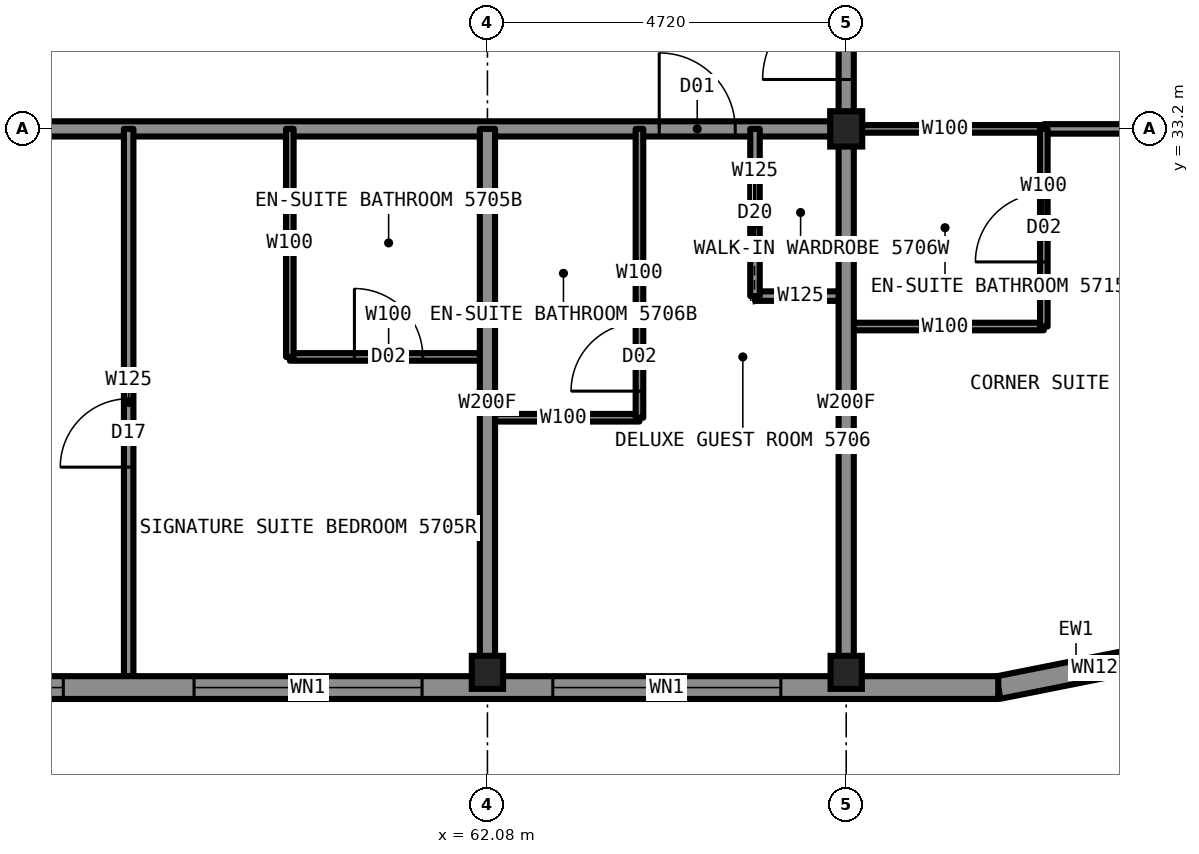
"""IFC4 building model, lengths in metres.
Left out: names, types, materials, properties, quantities, classifications, styles, units other than length and angle.
Written with IfcOpenShell. Run it as: python <this file> out.ifc"""

import sys

from ifc_helpers import new_model, si_unit, direction, frame, frame_2d, origin, origin_2d, place, context, subcontext, project, spatial, rectangle, i_section, extrude, element, fill, save


model = new_model("IFC4")
c1 = context("Model", 3, precision=1e-05, world=origin(), true_north=direction((0.0, 1.0)))
c2 = subcontext(c1, "Body", "Model", "MODEL_VIEW")
j1 = project(units=[si_unit("LENGTHUNIT", "METRE"), si_unit("PLANEANGLEUNIT", "RADIAN")], contexts=[c1])
p1 = place(None, origin())
s1 = spatial("IfcSite", under=j1, at=p1, CompositionType="ELEMENT")
p2 = place(p1, origin())
s2 = spatial("IfcBuilding", under=s1, at=p2, CompositionType="ELEMENT")
p3 = place(p2, frame((0.0, 0.0, 203.8)))
s3 = spatial("IfcBuildingStorey", under=s2, at=p3, CompositionType="ELEMENT", Elevation=203.8)
for number, where, z_axis, x_axis in (
    (1, (62.08, 26.05, 0.0), (0.0, 0.0, 1.0), (1.0, 0.0, 0.0)),
    (2, (66.8, 26.05, 0.0), (0.0, 0.0, 1.0), (1.0, 0.0, 0.0)),
):
    element("IfcColumn", number, at=place(p3, frame(where, z_axis=z_axis, x_axis=x_axis)), inside=s3, PredefinedType="COLUMN", context=c2, shape_type="SweptSolid", body=[
        extrude(i_section(OverallWidth=0.411, OverallDepth=0.434, WebThickness=0.036, FlangeThickness=0.057, at=origin_2d()), origin(), (0.0, 0.0, 1.0), 3.5),
    ])
p4 = place(p3, frame((66.8, 33.2, 0.0), z_axis=(0.0, 0.0, 1.0), x_axis=(1.0, 0.0, 0.0)))
e3 = element("IfcColumn", 3, at=p4, inside=s3, PredefinedType="COLUMN", context=c2, shape_type="SweptSolid", body=[
    extrude(i_section(OverallWidth=0.422, OverallDepth=0.465, WebThickness=0.045, FlangeThickness=0.073, at=origin_2d()), origin(), (0.0, 0.0, 1.0), 3.5),
])
p5 = place(p3, frame((66.8, 33.2, 0.0), z_axis=(0.0, 0.0, 1.0), x_axis=(1.0, 0.0, 0.0)))
e4 = element("IfcWall", 4, at=p5, inside=s3, PredefinedType="PARTITIONING", context=c2, shape_type="SweptSolid", body=[
    extrude(rectangle(XDim=2.6, YDim=0.1, at=frame_2d((1.3, 0.0))), origin(), (0.0, 0.0, 1.0), 2.573),
])
p6 = place(p3, frame((43.2, 33.2, 0.0), z_axis=(0.0, 0.0, 1.0), x_axis=(1.0, 0.0, 0.0)))
e5 = element("IfcWall", 5, at=p6, inside=s3, PredefinedType="PARTITIONING", context=c2, shape_type="SweptSolid", body=[
    extrude(rectangle(XDim=23.6, YDim=0.2, at=frame_2d((11.8, 0.0))), origin(), (0.0, 0.0, 1.0), 3.33),
])
p7 = place(p6, frame((2.55, 0.0, 0.0)))
e6 = element("IfcOpeningElement", 6, at=p7, cuts=e5, PredefinedType="OPENING", context=c2, shape_type="SweptSolid", body=[
    extrude(rectangle(XDim=1.0, YDim=2.2, at=frame_2d((0.5, 1.1))), frame((0.0, 0.11, 0.0), z_axis=(0.0, -1.0, 0.0), x_axis=(1.0, 0.0, 0.0)), (0.0, 0.0, 1.0), 0.22),
])
p8 = place(p6, frame((6.57, 0.0, 0.0)))
e7 = element("IfcOpeningElement", 7, at=p8, cuts=e5, PredefinedType="OPENING", context=c2, shape_type="SweptSolid", body=[
    extrude(rectangle(XDim=1.1, YDim=2.2, at=frame_2d((0.55, 1.1))), frame((0.0, 0.11, 0.0), z_axis=(0.0, -1.0, 0.0), x_axis=(1.0, 0.0, 0.0)), (0.0, 0.0, 1.0), 0.22),
])
p9 = place(p6, frame((21.14, 0.0, 0.0)))
e8 = element("IfcOpeningElement", 8, at=p9, cuts=e5, PredefinedType="OPENING", context=c2, shape_type="SweptSolid", body=[
    extrude(rectangle(XDim=1.0, YDim=2.2, at=frame_2d((0.5, 1.1))), frame((0.0, 0.11, 0.0), z_axis=(0.0, -1.0, 0.0), x_axis=(1.0, 0.0, 0.0)), (0.0, 0.0, 1.0), 0.22),
])
p10 = place(p3, frame((69.4, 33.2, 0.0), z_axis=(0.0, 0.0, 1.0), x_axis=(1.0, 0.0, 0.0)))
e9 = element("IfcWall", 9, at=p10, inside=s3, PredefinedType="PARTITIONING", context=c2, shape_type="SweptSolid", body=[
    extrude(rectangle(XDim=4.6, YDim=0.125, at=frame_2d((2.3, 0.0))), origin(), (0.0, 0.0, 1.0), 2.573),
])
p11 = place(p10, frame((1.15, 0.0, 0.0)))
e10 = element("IfcOpeningElement", 10, at=p11, cuts=e9, PredefinedType="OPENING", context=c2, shape_type="SweptSolid", body=[
    extrude(rectangle(XDim=0.9, YDim=2.2, at=frame_2d((0.45, 1.1))), frame((0.0, 0.073, 0.0), z_axis=(0.0, -1.0, 0.0), x_axis=(1.0, 0.0, 0.0)), (0.0, 0.0, 1.0), 0.145),
])
p12 = place(p3, frame((65.6, 31.0, 0.0), z_axis=(0.0, 0.0, 1.0), x_axis=(1.0, 0.0, 0.0)))
e11 = element("IfcWall", 11, at=p12, inside=s3, PredefinedType="PARTITIONING", context=c2, shape_type="SweptSolid", body=[
    extrude(rectangle(XDim=1.2, YDim=0.125, at=frame_2d((0.6, 0.0))), origin(), (0.0, 0.0, 1.0), 3.33),
])
p13 = place(p3, frame((66.8, 30.6, 0.0), z_axis=(0.0, 0.0, 1.0), x_axis=(1.0, 0.0, 0.0)))
e12 = element("IfcWall", 12, at=p13, inside=s3, PredefinedType="PARTITIONING", context=c2, shape_type="SweptSolid", body=[
    extrude(rectangle(XDim=2.6, YDim=0.1, at=frame_2d((1.3, 0.0))), origin(), (0.0, 0.0, 1.0), 3.33),
])
p14 = place(p3, frame((59.48, 30.2, 0.0), z_axis=(0.0, 0.0, 1.0), x_axis=(1.0, 0.0, 0.0)))
e13 = element("IfcWall", 13, at=p14, inside=s3, PredefinedType="PARTITIONING", context=c2, shape_type="SweptSolid", body=[
    extrude(rectangle(XDim=2.6, YDim=0.1, at=frame_2d((1.3, 0.0))), origin(), (0.0, 0.0, 1.0), 3.33),
])
p15 = place(p14, frame((0.85, 0.0, 0.0)))
e14 = element("IfcOpeningElement", 14, at=p15, cuts=e13, PredefinedType="OPENING", context=c2, shape_type="SweptSolid", body=[
    extrude(rectangle(XDim=0.9, YDim=2.1, at=frame_2d((0.45, 1.05))), frame((0.0, 0.06, 0.0), z_axis=(0.0, -1.0, 0.0), x_axis=(1.0, 0.0, 0.0)), (0.0, 0.0, 1.0), 0.12),
])
p16 = place(p3, frame((62.08, 29.4, 0.0), z_axis=(0.0, 0.0, 1.0), x_axis=(1.0, 0.0, 0.0)))
e15 = element("IfcWall", 15, at=p16, inside=s3, PredefinedType="PARTITIONING", context=c2, shape_type="SweptSolid", body=[
    extrude(rectangle(XDim=2.0, YDim=0.1, at=frame_2d((1.0, 0.0))), origin(), (0.0, 0.0, 1.0), 3.33),
])
p17 = place(p3, frame((65.6, 31.0, 0.0), z_axis=(0.0, 0.0, 1.0), x_axis=(0.0, 1.0, 0.0)))
e16 = element("IfcWall", 16, at=p17, inside=s3, PredefinedType="PARTITIONING", context=c2, shape_type="SweptSolid", body=[
    extrude(rectangle(XDim=2.2, YDim=0.125, at=frame_2d((1.1, 0.0))), origin(), (0.0, 0.0, 1.0), 3.33),
])
p18 = place(p17, frame((0.7, 0.0, 0.0)))
e17 = element("IfcOpeningElement", 17, at=p18, cuts=e16, PredefinedType="OPENING", context=c2, shape_type="SweptSolid", body=[
    extrude(rectangle(XDim=0.8, YDim=2.1, at=frame_2d((0.4, 1.05))), frame((0.0, 0.073, 0.0), z_axis=(0.0, -1.0, 0.0), x_axis=(1.0, 0.0, 0.0)), (0.0, 0.0, 1.0), 0.145),
])
p19 = place(p3, frame((66.8, 33.2, 0.0), z_axis=(0.0, 0.0, 1.0), x_axis=(0.0, 1.0, 0.0)))
e18 = element("IfcWall", 18, at=p19, inside=s3, PredefinedType="PARTITIONING", context=c2, shape_type="SweptSolid", body=[
    extrude(rectangle(XDim=23.58, YDim=0.2, at=frame_2d((11.79, 0.0))), origin(), (0.0, 0.0, 1.0), 3.33),
])
p20 = place(p19, frame((6.98, 0.0, 0.0)))
e19 = element("IfcOpeningElement", 19, at=p20, cuts=e18, PredefinedType="OPENING", context=c2, shape_type="SweptSolid", body=[
    extrude(rectangle(XDim=1.0, YDim=2.2, at=frame_2d((0.5, 1.1))), frame((0.0, 0.11, 0.0), z_axis=(0.0, -1.0, 0.0), x_axis=(1.0, 0.0, 0.0)), (0.0, 0.0, 1.0), 0.22),
])
p21 = place(p19, frame((11.7, 0.0, 0.0)))
e20 = element("IfcOpeningElement", 20, at=p21, cuts=e18, PredefinedType="OPENING", context=c2, shape_type="SweptSolid", body=[
    extrude(rectangle(XDim=1.0, YDim=2.2, at=frame_2d((0.5, 1.1))), frame((0.0, 0.11, 0.0), z_axis=(0.0, -1.0, 0.0), x_axis=(1.0, 0.0, 0.0)), (0.0, 0.0, 1.0), 0.22),
])
p22 = place(p19, frame((15.62, 0.0, 0.0)))
e21 = element("IfcOpeningElement", 21, at=p22, cuts=e18, PredefinedType="OPENING", context=c2, shape_type="SweptSolid", body=[
    extrude(rectangle(XDim=1.0, YDim=2.2, at=frame_2d((0.5, 1.1))), frame((0.0, 0.11, 0.0), z_axis=(0.0, -1.0, 0.0), x_axis=(1.0, 0.0, 0.0)), (0.0, 0.0, 1.0), 0.22),
])
p23 = place(p19, frame((22.05, 0.0, 0.0)))
e22 = element("IfcOpeningElement", 22, at=p23, cuts=e18, PredefinedType="OPENING", context=c2, shape_type="SweptSolid", body=[
    extrude(rectangle(XDim=1.1, YDim=2.2, at=frame_2d((0.55, 1.1))), frame((0.0, 0.11, 0.0), z_axis=(0.0, -1.0, 0.0), x_axis=(1.0, 0.0, 0.0)), (0.0, 0.0, 1.0), 0.22),
])
p24 = place(p19, frame((0.65, 0.0, 0.0)))
e23 = element("IfcOpeningElement", 23, at=p24, cuts=e18, PredefinedType="OPENING", context=c2, shape_type="SweptSolid", body=[
    extrude(rectangle(XDim=1.1, YDim=2.2, at=frame_2d((0.55, 1.1))), frame((0.0, 0.11, 0.0), z_axis=(0.0, -1.0, 0.0), x_axis=(1.0, 0.0, 0.0)), (0.0, 0.0, 1.0), 0.22),
])
p25 = place(p3, frame((66.8, 26.0, 0.0), z_axis=(0.0, 0.0, 1.0), x_axis=(0.0, 1.0, 0.0)))
e24 = element("IfcWall", 24, at=p25, inside=s3, PredefinedType="PARTITIONING", context=c2, shape_type="SweptSolid", body=[
    extrude(rectangle(XDim=7.2, YDim=0.2, at=frame_2d((3.6, 0.0))), origin(), (0.0, 0.0, 1.0), 2.573),
])
p26 = place(p3, frame((69.4, 30.6, 0.0), z_axis=(0.0, 0.0, 1.0), x_axis=(0.0, 1.0, 0.0)))
e25 = element("IfcWall", 25, at=p26, inside=s3, PredefinedType="PARTITIONING", context=c2, shape_type="SweptSolid", body=[
    extrude(rectangle(XDim=2.6, YDim=0.1, at=frame_2d((1.3, 0.0))), origin(), (0.0, 0.0, 1.0), 3.33),
])
p27 = place(p26, frame((0.85, 0.0, 0.0)))
e26 = element("IfcOpeningElement", 26, at=p27, cuts=e25, PredefinedType="OPENING", context=c2, shape_type="SweptSolid", body=[
    extrude(rectangle(XDim=0.9, YDim=2.1, at=frame_2d((0.45, 1.05))), frame((0.0, 0.06, 0.0), z_axis=(0.0, -1.0, 0.0), x_axis=(1.0, 0.0, 0.0)), (0.0, 0.0, 1.0), 0.12),
])
p28 = place(p3, frame((57.36, 26.0, 0.0), z_axis=(0.0, 0.0, 1.0), x_axis=(0.0, 1.0, 0.0)))
e27 = element("IfcWall", 27, at=p28, inside=s3, PredefinedType="PARTITIONING", context=c2, shape_type="SweptSolid", body=[
    extrude(rectangle(XDim=7.2, YDim=0.125, at=frame_2d((3.6, 0.0))), origin(), (0.0, 0.0, 1.0), 3.33),
])
p29 = place(p28, frame((2.75, 0.0, 0.0)))
e28 = element("IfcOpeningElement", 28, at=p29, cuts=e27, PredefinedType="OPENING", context=c2, shape_type="SweptSolid", body=[
    extrude(rectangle(XDim=0.9, YDim=2.2, at=frame_2d((0.45, 1.1))), frame((0.0, 0.073, 0.0), z_axis=(0.0, -1.0, 0.0), x_axis=(1.0, 0.0, 0.0)), (0.0, 0.0, 1.0), 0.145),
])
p30 = place(p3, frame((59.48, 30.2, 0.0), z_axis=(0.0, 0.0, 1.0), x_axis=(0.0, 1.0, 0.0)))
e29 = element("IfcWall", 29, at=p30, inside=s3, PredefinedType="PARTITIONING", context=c2, shape_type="SweptSolid", body=[
    extrude(rectangle(XDim=3.0, YDim=0.1, at=frame_2d((1.5, 0.0))), origin(), (0.0, 0.0, 1.0), 3.33),
])
p31 = place(p3, frame((62.08, 26.0, 0.0), z_axis=(0.0, 0.0, 1.0), x_axis=(0.0, 1.0, 0.0)))
e30 = element("IfcWall", 30, at=p31, inside=s3, PredefinedType="PARTITIONING", context=c2, shape_type="SweptSolid", body=[
    extrude(rectangle(XDim=7.2, YDim=0.2, at=frame_2d((3.6, 0.0))), origin(), (0.0, 0.0, 1.0), 2.573),
])
p32 = place(p3, frame((64.08, 29.4, 0.0), z_axis=(0.0, 0.0, 1.0), x_axis=(0.0, 1.0, 0.0)))
e31 = element("IfcWall", 31, at=p32, inside=s3, PredefinedType="PARTITIONING", context=c2, shape_type="SweptSolid", body=[
    extrude(rectangle(XDim=3.8, YDim=0.1, at=frame_2d((1.9, 0.0))), origin(), (0.0, 0.0, 1.0), 3.33),
])
p33 = place(p32, frame((0.35, 0.0, 0.0)))
e32 = element("IfcOpeningElement", 32, at=p33, cuts=e31, PredefinedType="OPENING", context=c2, shape_type="SweptSolid", body=[
    extrude(rectangle(XDim=0.9, YDim=2.1, at=frame_2d((0.45, 1.05))), frame((0.0, 0.06, 0.0), z_axis=(0.0, -1.0, 0.0), x_axis=(1.0, 0.0, 0.0)), (0.0, 0.0, 1.0), 0.12),
])
p34 = place(p3, frame((68.8, 25.85, 0.0), z_axis=(0.0, 0.0, 1.0), x_axis=(0.980787050784, 0.195081421501, 0.0)))
e33 = element("IfcWall", 33, at=p34, inside=s3, PredefinedType="SOLIDWALL", context=c2, shape_type="SweptSolid", body=[
    extrude(rectangle(XDim=2.087, YDim=0.3, at=frame_2d((1.044, 0.0))), origin(), (0.0, 0.0, 1.0), 3.33),
])
p35 = place(p34, frame((0.444, 0.0, 0.3)))
e34 = element("IfcOpeningElement", 34, at=p35, cuts=e33, PredefinedType="OPENING", context=c2, shape_type="SweptSolid", body=[
    extrude(rectangle(XDim=1.2, YDim=2.0, at=frame_2d((0.6, 1.0))), frame((0.0, 0.16, 0.0), z_axis=(0.0, -1.0, 0.0), x_axis=(1.0, 0.0, 0.0)), (0.0, 0.0, 1.0), 0.32),
])
p36 = place(p3, frame((41.2, 25.85, 0.0), z_axis=(0.0, 0.0, 1.0), x_axis=(1.0, 0.0, 0.0)))
e35 = element("IfcWall", 35, at=p36, inside=s3, PredefinedType="SOLIDWALL", context=c2, shape_type="SweptSolid", body=[
    extrude(rectangle(XDim=27.6, YDim=0.3, at=frame_2d((13.8, 0.0))), origin(), (0.0, 0.0, 1.0), 2.83),
])
p37 = place(p36, frame((2.86, 0.0, 0.3)))
e36 = element("IfcOpeningElement", 36, at=p37, cuts=e35, PredefinedType="OPENING", context=c2, shape_type="SweptSolid", body=[
    extrude(rectangle(XDim=0.7, YDim=1.2, at=frame_2d((0.35, 0.6))), frame((0.0, 0.16, 0.0), z_axis=(0.0, -1.0, 0.0), x_axis=(1.0, 0.0, 0.0)), (0.0, 0.0, 1.0), 0.32),
])
p38 = place(p36, frame((7.58, 0.0, 0.3)))
e37 = element("IfcOpeningElement", 37, at=p38, cuts=e35, PredefinedType="OPENING", context=c2, shape_type="SweptSolid", body=[
    extrude(rectangle(XDim=3.0, YDim=2.0, at=frame_2d((1.5, 1.0))), frame((0.0, 0.16, 0.0), z_axis=(0.0, -1.0, 0.0), x_axis=(1.0, 0.0, 0.0)), (0.0, 0.0, 1.0), 0.32),
])
p39 = place(p36, frame((12.3, 0.0, 0.3)))
e38 = element("IfcOpeningElement", 38, at=p39, cuts=e35, PredefinedType="OPENING", context=c2, shape_type="SweptSolid", body=[
    extrude(rectangle(XDim=3.0, YDim=2.0, at=frame_2d((1.5, 1.0))), frame((0.0, 0.16, 0.0), z_axis=(0.0, -1.0, 0.0), x_axis=(1.0, 0.0, 0.0)), (0.0, 0.0, 1.0), 0.32),
])
p40 = place(p36, frame((17.02, 0.0, 0.3)))
e39 = element("IfcOpeningElement", 39, at=p40, cuts=e35, PredefinedType="OPENING", context=c2, shape_type="SweptSolid", body=[
    extrude(rectangle(XDim=3.0, YDim=2.0, at=frame_2d((1.5, 1.0))), frame((0.0, 0.16, 0.0), z_axis=(0.0, -1.0, 0.0), x_axis=(1.0, 0.0, 0.0)), (0.0, 0.0, 1.0), 0.32),
])
p41 = place(p36, frame((23.99, 0.0, 0.3)))
e40 = element("IfcOpeningElement", 40, at=p41, cuts=e35, PredefinedType="OPENING", context=c2, shape_type="SweptSolid", body=[
    extrude(rectangle(XDim=0.7, YDim=1.2, at=frame_2d((0.35, 0.6))), frame((0.0, 0.16, 0.0), z_axis=(0.0, -1.0, 0.0), x_axis=(1.0, 0.0, 0.0)), (0.0, 0.0, 1.0), 0.32),
])
p42 = place(p15, origin())
e41 = element("IfcDoor", 41, at=p42, inside=s3, OperationType="SINGLE_SWING_RIGHT", PredefinedType="DOOR", context=c2, shape_type="SweptSolid", body=[
    extrude(rectangle(XDim=0.9, YDim=2.1, at=frame_2d((0.45, 1.05))), frame((0.0, 0.025, 0.0), z_axis=(0.0, -1.0, 0.0), x_axis=(1.0, 0.0, 0.0)), (0.0, 0.0, 1.0), 0.05),
])
fill(e14, e41)
p43 = place(p29, origin())
e42 = element("IfcDoor", 42, at=p43, inside=s3, OperationType="SINGLE_SWING_LEFT", PredefinedType="DOOR", context=c2, shape_type="SweptSolid", body=[
    extrude(rectangle(XDim=0.9, YDim=2.2, at=frame_2d((0.45, 1.1))), frame((0.0, 0.025, 0.0), z_axis=(0.0, -1.0, 0.0), x_axis=(1.0, 0.0, 0.0)), (0.0, 0.0, 1.0), 0.05),
])
fill(e28, e42)
p44 = place(p9, origin())
e43 = element("IfcDoor", 43, at=p44, inside=s3, OperationType="SINGLE_SWING_LEFT", PredefinedType="DOOR", context=c2, shape_type="SweptSolid", body=[
    extrude(rectangle(XDim=1.0, YDim=2.2, at=frame_2d((0.5, 1.1))), frame((0.0, 0.025, 0.0), z_axis=(0.0, -1.0, 0.0), x_axis=(1.0, 0.0, 0.0)), (0.0, 0.0, 1.0), 0.05),
])
fill(e8, e43)
p45 = place(p33, origin())
e44 = element("IfcDoor", 44, at=p45, inside=s3, OperationType="SINGLE_SWING_RIGHT", PredefinedType="DOOR", context=c2, shape_type="SweptSolid", body=[
    extrude(rectangle(XDim=0.9, YDim=2.1, at=frame_2d((0.45, 1.05))), frame((0.0, 0.025, 0.0), z_axis=(0.0, -1.0, 0.0), x_axis=(1.0, 0.0, 0.0)), (0.0, 0.0, 1.0), 0.05),
])
fill(e32, e44)
p46 = place(p18, origin())
e45 = element("IfcDoor", 45, at=p46, inside=s3, OperationType="SLIDING_TO_LEFT", PredefinedType="DOOR", context=c2, shape_type="SweptSolid", body=[
    extrude(rectangle(XDim=0.8, YDim=2.1, at=frame_2d((0.4, 1.05))), frame((0.0, 0.025, 0.0), z_axis=(0.0, -1.0, 0.0), x_axis=(1.0, 0.0, 0.0)), (0.0, 0.0, 1.0), 0.05),
])
fill(e17, e45)
p47 = place(p24, origin())
e46 = element("IfcDoor", 46, at=p47, inside=s3, OperationType="SINGLE_SWING_LEFT", PredefinedType="DOOR", context=c2, shape_type="SweptSolid", body=[
    extrude(rectangle(XDim=1.1, YDim=2.2, at=frame_2d((0.55, 1.1))), frame((0.0, 0.025, 0.0), z_axis=(0.0, -1.0, 0.0), x_axis=(1.0, 0.0, 0.0)), (0.0, 0.0, 1.0), 0.05),
])
fill(e23, e46)
p48 = place(p27, origin())
e47 = element("IfcDoor", 47, at=p48, inside=s3, OperationType="SINGLE_SWING_RIGHT", PredefinedType="DOOR", context=c2, shape_type="SweptSolid", body=[
    extrude(rectangle(XDim=0.9, YDim=2.1, at=frame_2d((0.45, 1.05))), frame((0.0, 0.025, 0.0), z_axis=(0.0, -1.0, 0.0), x_axis=(1.0, 0.0, 0.0)), (0.0, 0.0, 1.0), 0.05),
])
fill(e26, e47)
p49 = place(p35, origin())
e48 = element("IfcWindow", 48, at=p49, inside=s3, PartitioningType="SINGLE_PANEL", PredefinedType="WINDOW", context=c2, shape_type="SweptSolid", body=[
    extrude(rectangle(XDim=1.2, YDim=2.0, at=frame_2d((0.6, 1.0))), frame((0.0, 0.13, 0.0), z_axis=(0.0, -1.0, 0.0), x_axis=(1.0, 0.0, 0.0)), (0.0, 0.0, 1.0), 0.06),
])
fill(e34, e48)
p50 = place(p39, origin())
e49 = element("IfcWindow", 49, at=p50, inside=s3, PartitioningType="SINGLE_PANEL", PredefinedType="WINDOW", context=c2, shape_type="SweptSolid", body=[
    extrude(rectangle(XDim=3.0, YDim=2.0, at=frame_2d((1.5, 1.0))), frame((0.0, 0.13, 0.0), z_axis=(0.0, -1.0, 0.0), x_axis=(1.0, 0.0, 0.0)), (0.0, 0.0, 1.0), 0.06),
])
fill(e38, e49)
p51 = place(p40, origin())
e50 = element("IfcWindow", 50, at=p51, inside=s3, PartitioningType="SINGLE_PANEL", PredefinedType="WINDOW", context=c2, shape_type="SweptSolid", body=[
    extrude(rectangle(XDim=3.0, YDim=2.0, at=frame_2d((1.5, 1.0))), frame((0.0, 0.13, 0.0), z_axis=(0.0, -1.0, 0.0), x_axis=(1.0, 0.0, 0.0)), (0.0, 0.0, 1.0), 0.06),
])
fill(e39, e50)
p52 = place(p41, origin())
e51 = element("IfcWindow", 51, at=p52, inside=s3, PartitioningType="SINGLE_PANEL", PredefinedType="WINDOW", context=c2, shape_type="SweptSolid", body=[
    extrude(rectangle(XDim=0.7, YDim=1.2, at=frame_2d((0.35, 0.6))), frame((0.0, 0.13, 0.0), z_axis=(0.0, -1.0, 0.0), x_axis=(1.0, 0.0, 0.0)), (0.0, 0.0, 1.0), 0.06),
])
fill(e40, e51)
save(model, sys.argv[1])
